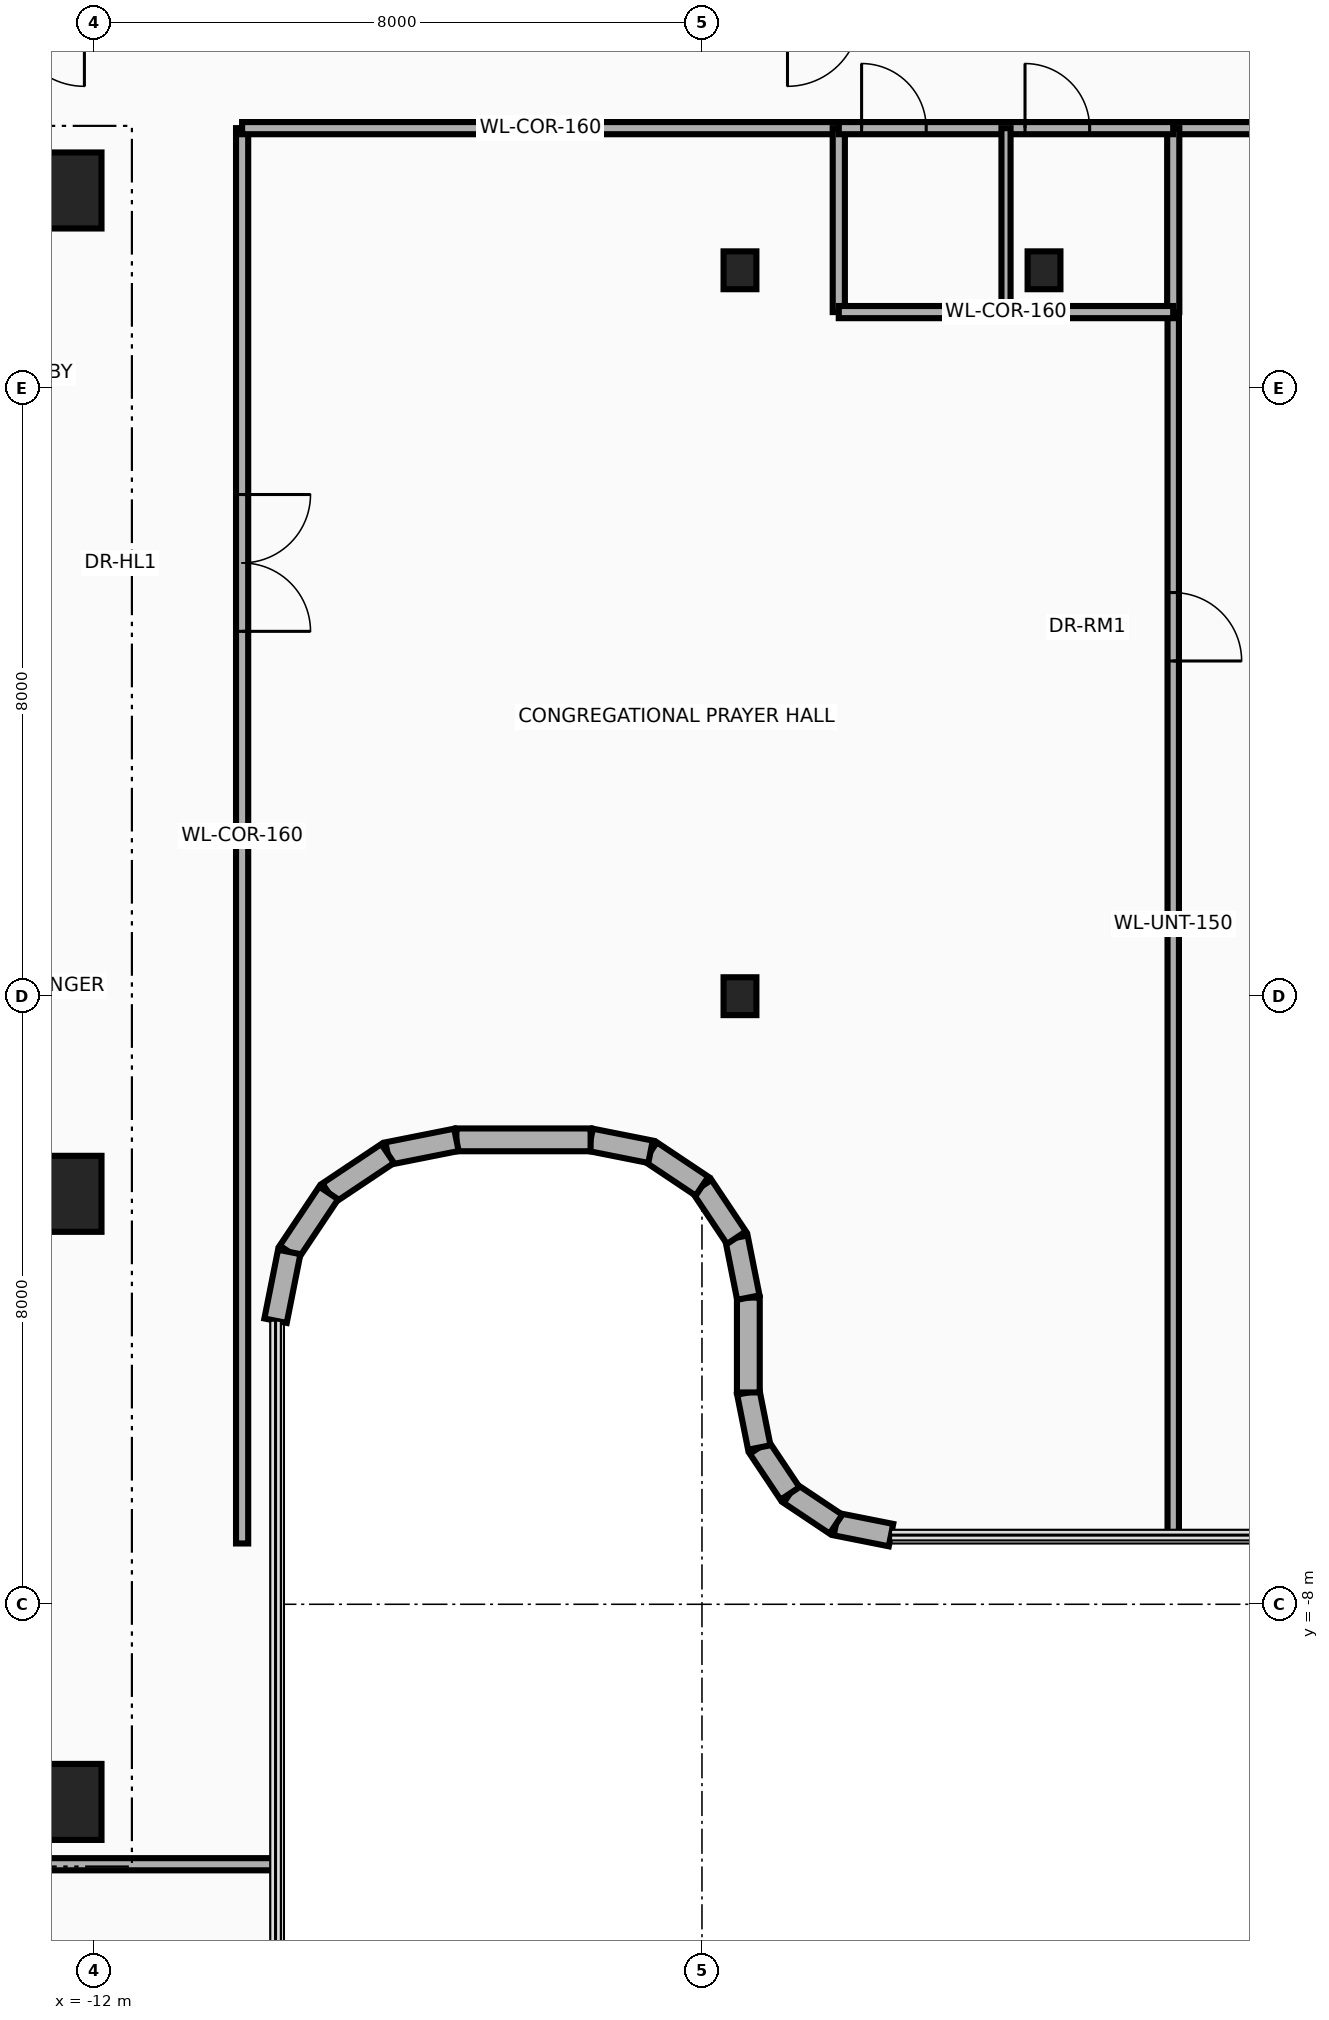
"""IFC4 building model, lengths in metres.
Left out: names, types, materials, properties, quantities, classifications, styles, units other than length and angle.
Written with IfcOpenShell. Run it as: python <this file> out.ifc"""

import sys

from ifc_helpers import new_model, si_unit, direction, frame, frame_2d, origin, origin_2d, place, context, subcontext, project, spatial, rectangle, i_section, extrude, source, transform, mapped, element, fill, save


model = new_model("IFC4")
c1 = context("Model", 3, precision=1e-05, world=origin(), true_north=direction((0.0, 1.0)))
c2 = subcontext(c1, "Body", "Model", "MODEL_VIEW")
j1 = project(units=[si_unit("LENGTHUNIT", "METRE"), si_unit("PLANEANGLEUNIT", "RADIAN")], contexts=[c1])
p1 = place(None, origin())
s1 = spatial("IfcSite", under=j1, at=p1, CompositionType="ELEMENT")
p2 = place(p1, origin())
s2 = spatial("IfcBuilding", under=s1, at=p2, CompositionType="ELEMENT")
p3 = place(p2, frame((0.0, 0.0, 176.55)))
s3 = spatial("IfcBuildingStorey", under=s2, at=p3, CompositionType="ELEMENT", Elevation=176.55)
for number, where, z_axis, x_axis in (
    (1, (-22.65, 10.8, 0.0), (0.0, 0.0, 1.0), (1.0, 0.0, 0.0)),
    (2, (-22.65, -10.8, 0.0), (0.0, 0.0, 1.0), (1.0, 0.0, 0.0)),
):
    element("IfcWall", number, at=place(p3, frame(where, z_axis=z_axis, x_axis=x_axis)), inside=s3, PredefinedType="SHEAR", context=c2, shape_type="SweptSolid", body=[
        extrude(rectangle(XDim=10.25, YDim=0.55, at=frame_2d((5.125, 0.0))), origin(), (0.0, 0.0, 1.0), 3.63),
    ])
m1 = source(origin(), c2, "Body", "SweptSolid", [
    extrude(rectangle(XDim=1.0, YDim=1.0, at=origin_2d()), origin(), (0.0, 0.0, 1.0), 3.95),
])
for number, where, z_axis, x_axis in (
    (3, (-12.4, -10.6, 0.0), (0.0, 0.0, 1.0), (1.0, 0.0, 0.0)),
    (4, (-12.4, -2.6, 0.0), (0.0, 0.0, 1.0), (1.0, 0.0, 0.0)),
    (5, (-12.4, 10.6, 0.0), (0.0, 0.0, 1.0), (1.0, 0.0, 0.0)),
):
    element("IfcColumn", number, at=place(p3, frame(where, z_axis=z_axis, x_axis=x_axis)), inside=s3, PredefinedType="COLUMN", context=c2, shape_type="MappedRepresentation", body=[
        mapped(m1, transform((0.0, 0.0, 0.0), x_axis=(1.0, 0.0, 0.0), y_axis=(0.0, 1.0, 0.0), z_axis=(0.0, 0.0, 1.0), scale=1.0)),
    ])
m2 = source(origin(), c2, "Body", "SweptSolid", [
    extrude(i_section(OverallWidth=0.432, OverallDepth=0.498, WebThickness=0.056, FlangeThickness=0.089, at=origin_2d()), origin(), (0.0, 0.0, 1.0), 3.95),
])
for number, where, z_axis, x_axis in (
    (6, (-3.5, 0.0, 0.0), (0.0, 0.0, 1.0), (1.0, 0.0, 0.0)),
    (7, (-3.5, 9.55, 0.0), (0.0, 0.0, 1.0), (1.0, 0.0, 0.0)),
    (8, (0.5, 9.55, 0.0), (0.0, 0.0, 1.0), (1.0, 0.0, 0.0)),
):
    element("IfcColumn", number, at=place(p3, frame(where, z_axis=z_axis, x_axis=x_axis)), inside=s3, PredefinedType="COLUMN", context=c2, shape_type="MappedRepresentation", body=[
        mapped(m2, transform((0.0, 0.0, 0.0), x_axis=(1.0, 0.0, 0.0), y_axis=(0.0, 1.0, 0.0), z_axis=(0.0, 0.0, 1.0), scale=1.0)),
    ])
p4 = place(p3, frame((-1.513, -7.09, 0.0), z_axis=(0.0, 0.0, 1.0), x_axis=(-0.980783640462, 0.195098566376, 0.0)))
e9 = element("IfcWall", 9, at=p4, inside=s3, PredefinedType="SOLIDWALL", context=c2, shape_type="SweptSolid", body=[
    extrude(rectangle(XDim=0.738, YDim=0.3, at=frame_2d((0.369, 0.0))), origin(), (0.0, 0.0, 1.0), 3.076),
])
p5 = place(p3, frame((-2.237, -6.946, 0.0), z_axis=(0.0, 0.0, 1.0), x_axis=(-0.831378135196, 0.555707113792, 0.0)))
e10 = element("IfcWall", 10, at=p5, inside=s3, PredefinedType="SOLIDWALL", context=c2, shape_type="SweptSolid", body=[
    extrude(rectangle(XDim=0.727, YDim=0.3, at=frame_2d((0.364, 0.0))), origin(), (0.0, 0.0, 1.0), 3.63),
])
p6 = place(p3, frame((-2.842, -6.542, 0.0), z_axis=(0.0, 0.0, 1.0), x_axis=(-0.555784030735, 0.83132671747, 0.0)))
e11 = element("IfcWall", 11, at=p6, inside=s3, PredefinedType="SOLIDWALL", context=c2, shape_type="SweptSolid", body=[
    extrude(rectangle(XDim=0.728, YDim=0.3, at=frame_2d((0.364, 0.0))), origin(), (0.0, 0.0, 1.0), 2.615),
])
p7 = place(p3, frame((-3.246, -5.937, 0.0), z_axis=(0.0, 0.0, 1.0), x_axis=(-0.194780446724, 0.980846867546, 0.0)))
e12 = element("IfcWall", 12, at=p7, inside=s3, PredefinedType="SOLIDWALL", context=c2, shape_type="SweptSolid", body=[
    extrude(rectangle(XDim=0.738, YDim=0.3, at=frame_2d((0.369, 0.0))), origin(), (0.0, 0.0, 1.0), 2.615),
])
p8 = place(p3, frame((-3.39, -5.213, 0.0), z_axis=(0.0, 0.0, 1.0), x_axis=(0.0, 1.0, 0.0)))
e13 = element("IfcWall", 13, at=p8, inside=s3, PredefinedType="SOLIDWALL", context=c2, shape_type="SweptSolid", body=[
    extrude(rectangle(XDim=1.248, YDim=0.3, at=frame_2d((0.624, 0.0))), origin(), (0.0, 0.0, 1.0), 2.615),
])
p9 = place(p3, frame((-3.39, -3.965, 0.0), z_axis=(0.0, 0.0, 1.0), x_axis=(-0.195356525272, 0.980732291726, 0.0)))
e14 = element("IfcWall", 14, at=p9, inside=s3, PredefinedType="SOLIDWALL", context=c2, shape_type="SweptSolid", body=[
    extrude(rectangle(XDim=0.803, YDim=0.3, at=frame_2d((0.402, 0.0))), origin(), (0.0, 0.0, 1.0), 2.615),
])
for number, where, z_axis, x_axis in (
    (15, (-3.547, -3.177, 0.0), (0.0, 0.0, 1.0), (-0.556, 0.831, 0.0)),
    (16, (-4.0, -2.5, 0.0), (0.0, 0.0, 1.0), (-0.831, 0.556, 0.0)),
):
    element("IfcWall", number, at=place(p3, frame(where, z_axis=z_axis, x_axis=x_axis)), inside=s3, PredefinedType="SOLIDWALL", context=c2, shape_type="SweptSolid", body=[
        extrude(rectangle(XDim=0.815, YDim=0.3, at=frame_2d((0.407, 0.0))), origin(), (0.0, 0.0, 1.0), 2.615),
    ])
p10 = place(p3, frame((-4.677, -2.047, 0.0), z_axis=(0.0, 0.0, 1.0), x_axis=(-0.980732291726, 0.195356525272, 0.0)))
e17 = element("IfcWall", 17, at=p10, inside=s3, PredefinedType="SOLIDWALL", context=c2, shape_type="SweptSolid", body=[
    extrude(rectangle(XDim=0.803, YDim=0.3, at=frame_2d((0.402, 0.0))), origin(), (0.0, 0.0, 1.0), 3.63),
])
p11 = place(p3, frame((-5.465, -1.89, 0.0), z_axis=(0.0, 0.0, 1.0), x_axis=(-1.0, 0.0, 0.0)))
e18 = element("IfcWall", 18, at=p11, inside=s3, PredefinedType="SOLIDWALL", context=c2, shape_type="SweptSolid", body=[
    extrude(rectangle(XDim=1.766, YDim=0.3, at=frame_2d((0.883, 0.0))), origin(), (0.0, 0.0, 1.0), 3.63),
])
p12 = place(p3, frame((-7.231, -1.89, 0.0), z_axis=(0.0, 0.0, 1.0), x_axis=(-0.980743190895, -0.195301801101, 0.0)))
e19 = element("IfcWall", 19, at=p12, inside=s3, PredefinedType="SOLIDWALL", context=c2, shape_type="SweptSolid", body=[
    extrude(rectangle(XDim=0.923, YDim=0.3, at=frame_2d((0.461, 0.0))), origin(), (0.0, 0.0, 1.0), 2.415),
])
p13 = place(p3, frame((-8.135, -2.07, 0.0), z_axis=(0.0, 0.0, 1.0), x_axis=(-0.831607331814, -0.555364065883, 0.0)))
e20 = element("IfcWall", 20, at=p13, inside=s3, PredefinedType="SOLIDWALL", context=c2, shape_type="SweptSolid", body=[
    extrude(rectangle(XDim=0.933, YDim=0.3, at=frame_2d((0.467, 0.0))), origin(), (0.0, 0.0, 1.0), 2.415),
])
p14 = place(p3, frame((-8.912, -2.588, 0.0), z_axis=(0.0, 0.0, 1.0), x_axis=(-0.555364065883, -0.831607331814, 0.0)))
e21 = element("IfcWall", 21, at=p14, inside=s3, PredefinedType="SOLIDWALL", context=c2, shape_type="SweptSolid", body=[
    extrude(rectangle(XDim=0.933, YDim=0.3, at=frame_2d((0.467, 0.0))), origin(), (0.0, 0.0, 1.0), 3.63),
])
p15 = place(p3, frame((-9.43, -3.365, 0.0), z_axis=(0.0, 0.0, 1.0), x_axis=(-0.195301801101, -0.980743190895, 0.0)))
e22 = element("IfcWall", 22, at=p15, inside=s3, PredefinedType="SOLIDWALL", context=c2, shape_type="SweptSolid", body=[
    extrude(rectangle(XDim=0.923, YDim=0.3, at=frame_2d((0.461, 0.0))), origin(), (0.0, 0.0, 1.0), 3.63),
])
p16 = place(p3, frame((-23.45, -11.42, 0.0), z_axis=(0.0, 0.0, 1.0), x_axis=(1.0, 0.0, 0.0)))
e23 = element("IfcWall", 23, at=p16, inside=s3, PredefinedType="PARTITIONING", context=c2, shape_type="SweptSolid", body=[
    extrude(rectangle(XDim=13.84, YDim=0.16, at=frame_2d((6.92, 0.0))), origin(), (0.0, 0.0, 1.0), 3.004),
])
p17 = place(p3, frame((-10.05, -7.2, 0.0), z_axis=(0.0, 0.0, 1.0), x_axis=(0.0, 1.0, 0.0)))
e24 = element("IfcWall", 24, at=p17, inside=s3, PredefinedType="PARTITIONING", context=c2, shape_type="SweptSolid", body=[
    extrude(rectangle(XDim=18.62, YDim=0.16, at=frame_2d((9.31, 0.0))), origin(), (0.0, 0.0, 1.0), 2.415),
])
p18 = place(p17, frame((12.0, 0.0, 0.0)))
e25 = element("IfcOpeningElement", 25, at=p18, cuts=e24, PredefinedType="OPENING", context=c2, shape_type="SweptSolid", body=[
    extrude(rectangle(XDim=1.8, YDim=2.15, at=frame_2d((0.9, 1.075))), frame((0.0, 0.095, 0.0), z_axis=(0.0, -1.0, 0.0), x_axis=(1.0, 0.0, 0.0)), (0.0, 0.0, 1.0), 0.19),
])
p19 = place(p3, frame((-10.05, 11.42, 0.0), z_axis=(0.0, 0.0, 1.0), x_axis=(1.0, 0.0, 0.0)))
e26 = element("IfcWall", 26, at=p19, inside=s3, PredefinedType="PARTITIONING", context=c2, shape_type="SweptSolid", body=[
    extrude(rectangle(XDim=7.85, YDim=0.16, at=frame_2d((3.925, 0.0))), origin(), (0.0, 0.0, 1.0), 2.615),
])
p20 = place(p3, frame((2.2, 11.42, 0.0), z_axis=(0.0, 0.0, 1.0), x_axis=(1.0, 0.0, 0.0)))
e27 = element("IfcWall", 27, at=p20, inside=s3, PredefinedType="PARTITIONING", context=c2, shape_type="SweptSolid", body=[
    extrude(rectangle(XDim=11.22, YDim=0.16, at=frame_2d((5.61, 0.0))), origin(), (0.0, 0.0, 1.0), 2.615),
])
p21 = place(p20, frame((4.0, 0.0, 0.0)))
e28 = element("IfcOpeningElement", 28, at=p21, cuts=e27, PredefinedType="OPENING", context=c2, shape_type="SweptSolid", body=[
    extrude(rectangle(XDim=1.8, YDim=2.15, at=frame_2d((0.9, 1.075))), frame((0.0, 0.095, 0.0), z_axis=(0.0, -1.0, 0.0), x_axis=(1.0, 0.0, 0.0)), (0.0, 0.0, 1.0), 0.19),
])
p22 = place(p3, frame((2.2, -7.09, 0.0), z_axis=(0.0, 0.0, 1.0), x_axis=(0.0, 1.0, 0.0)))
e29 = element("IfcWall", 29, at=p22, inside=s3, PredefinedType="PARTITIONING", context=c2, shape_type="SweptSolid", body=[
    extrude(rectangle(XDim=16.09, YDim=0.15, at=frame_2d((8.045, 0.0))), origin(), (0.0, 0.0, 1.0), 2.665),
])
p23 = place(p22, frame((11.5, 0.0, 0.0)))
e30 = element("IfcOpeningElement", 30, at=p23, cuts=e29, PredefinedType="OPENING", context=c2, shape_type="SweptSolid", body=[
    extrude(rectangle(XDim=0.9, YDim=2.1, at=frame_2d((0.45, 1.05))), frame((0.0, 0.09, 0.0), z_axis=(0.0, -1.0, 0.0), x_axis=(1.0, 0.0, 0.0)), (0.0, 0.0, 1.0), 0.18),
])
for number, where, z_axis, x_axis in (
    (31, (-2.2, 9.0, 0.0), (0.0, 0.0, 1.0), (0.0, 1.0, 0.0)),
    (32, (2.2, 9.0, 0.0), (0.0, 0.0, 1.0), (0.0, 1.0, 0.0)),
):
    element("IfcWall", number, at=place(p3, frame(where, z_axis=z_axis, x_axis=x_axis)), inside=s3, PredefinedType="PARTITIONING", context=c2, shape_type="SweptSolid", body=[
        extrude(rectangle(XDim=2.42, YDim=0.16, at=frame_2d((1.21, 0.0))), origin(), (0.0, 0.0, 1.0), 2.665),
    ])
p24 = place(p3, frame((-2.2, 9.0, 0.0), z_axis=(0.0, 0.0, 1.0), x_axis=(1.0, 0.0, 0.0)))
e33 = element("IfcWall", 33, at=p24, inside=s3, PredefinedType="PARTITIONING", context=c2, shape_type="SweptSolid", body=[
    extrude(rectangle(XDim=4.4, YDim=0.16, at=frame_2d((2.2, 0.0))), origin(), (0.0, 0.0, 1.0), 3.63),
])
p25 = place(p3, frame((-2.2, 11.42, 0.0), z_axis=(0.0, 0.0, 1.0), x_axis=(1.0, 0.0, 0.0)))
e34 = element("IfcWall", 34, at=p25, inside=s3, PredefinedType="PARTITIONING", context=c2, shape_type="SweptSolid", body=[
    extrude(rectangle(XDim=4.4, YDim=0.16, at=frame_2d((2.2, 0.0))), origin(), (0.0, 0.0, 1.0), 3.63),
])
p26 = place(p25, frame((0.3, 0.0, 0.0)))
e35 = element("IfcOpeningElement", 35, at=p26, cuts=e34, PredefinedType="OPENING", context=c2, shape_type="SweptSolid", body=[
    extrude(rectangle(XDim=0.85, YDim=2.1, at=frame_2d((0.425, 1.05))), frame((0.0, 0.095, 0.0), z_axis=(0.0, -1.0, 0.0), x_axis=(1.0, 0.0, 0.0)), (0.0, 0.0, 1.0), 0.19),
])
p27 = place(p25, frame((2.45, 0.0, 0.0)))
e36 = element("IfcOpeningElement", 36, at=p27, cuts=e34, PredefinedType="OPENING", context=c2, shape_type="SweptSolid", body=[
    extrude(rectangle(XDim=0.85, YDim=2.1, at=frame_2d((0.425, 1.05))), frame((0.0, 0.095, 0.0), z_axis=(0.0, -1.0, 0.0), x_axis=(1.0, 0.0, 0.0)), (0.0, 0.0, 1.0), 0.19),
])
p28 = place(p3, frame((0.0, 9.0, 0.0), z_axis=(0.0, 0.0, 1.0), x_axis=(0.0, 1.0, 0.0)))
e37 = element("IfcWall", 37, at=p28, inside=s3, PredefinedType="PARTITIONING", context=c2, shape_type="SweptSolid", body=[
    extrude(rectangle(XDim=2.42, YDim=0.12, at=frame_2d((1.21, 0.0))), origin(), (0.0, 0.0, 1.0), 2.665),
])
p29 = place(p18, frame((1.8, 0.0, 0.0), z_axis=(0.0, 0.0, 1.0), x_axis=(-1.0, 0.0, 0.0)))
e38 = element("IfcDoor", 38, at=p29, inside=s3, OperationType="DOUBLE_DOOR_SINGLE_SWING", PredefinedType="DOOR", context=c2, shape_type="SweptSolid", body=[
    extrude(rectangle(XDim=1.8, YDim=2.15, at=frame_2d((0.9, 1.075))), frame((0.0, 0.025, 0.0), z_axis=(0.0, -1.0, 0.0), x_axis=(1.0, 0.0, 0.0)), (0.0, 0.0, 1.0), 0.05),
])
fill(e25, e38)
p30 = place(p23, frame((0.9, 0.0, 0.0), z_axis=(0.0, 0.0, 1.0), x_axis=(-1.0, 0.0, 0.0)))
e39 = element("IfcDoor", 39, at=p30, inside=s3, OperationType="SINGLE_SWING_LEFT", PredefinedType="DOOR", context=c2, shape_type="SweptSolid", body=[
    extrude(rectangle(XDim=0.9, YDim=2.1, at=frame_2d((0.45, 1.05))), frame((0.0, 0.025, 0.0), z_axis=(0.0, -1.0, 0.0), x_axis=(1.0, 0.0, 0.0)), (0.0, 0.0, 1.0), 0.05),
])
fill(e30, e39)
p31 = place(p26, origin())
e40 = element("IfcDoor", 40, at=p31, inside=s3, OperationType="SINGLE_SWING_RIGHT", PredefinedType="DOOR", context=c2, shape_type="SweptSolid", body=[
    extrude(rectangle(XDim=0.85, YDim=2.1, at=frame_2d((0.425, 1.05))), frame((0.0, 0.025, 0.0), z_axis=(0.0, -1.0, 0.0), x_axis=(1.0, 0.0, 0.0)), (0.0, 0.0, 1.0), 0.05),
])
fill(e35, e40)
p32 = place(p27, origin())
e41 = element("IfcDoor", 41, at=p32, inside=s3, OperationType="SINGLE_SWING_LEFT", PredefinedType="DOOR", context=c2, shape_type="SweptSolid", body=[
    extrude(rectangle(XDim=0.85, YDim=2.1, at=frame_2d((0.425, 1.05))), frame((0.0, 0.025, 0.0), z_axis=(0.0, -1.0, 0.0), x_axis=(1.0, 0.0, 0.0)), (0.0, 0.0, 1.0), 0.05),
])
fill(e36, e41)
save(model, sys.argv[1])
